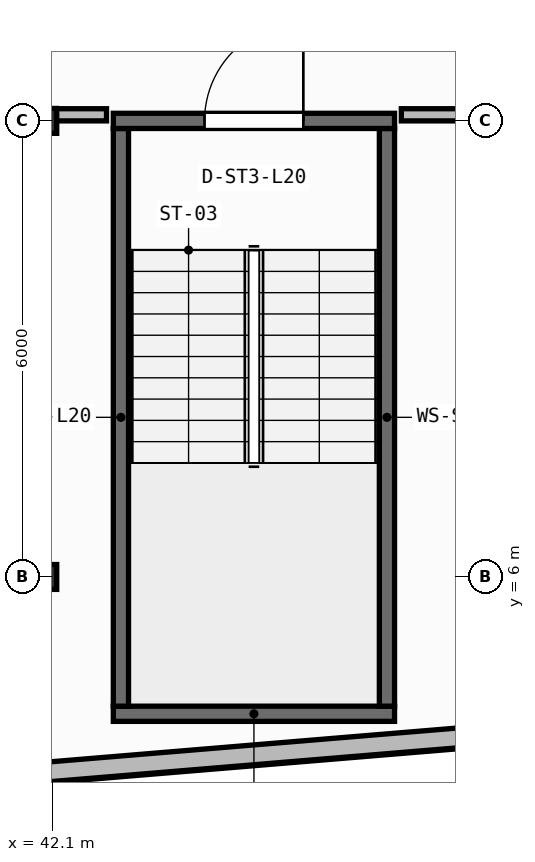
"""IFC4 building model, lengths in metres.
Left out: names, types, materials, properties, quantities, classifications, styles, units other than length and angle.
Written with IfcOpenShell. Run it as: python <this file> out.ifc"""

import sys

from ifc_helpers import new_model, si_unit, direction, frame, frame_2d, origin, origin_2d, place, context, subcontext, project, spatial, rectangle, i_section, extrude, element, fill, save


model = new_model("IFC4")
c1 = context("Model", 3, precision=1e-05, world=origin(), true_north=direction((0.0, 1.0)))
c2 = subcontext(c1, "Body", "Model", "MODEL_VIEW")
j1 = project(units=[si_unit("LENGTHUNIT", "METRE"), si_unit("PLANEANGLEUNIT", "RADIAN")], contexts=[c1])
p1 = place(None, origin())
s1 = spatial("IfcSite", under=j1, at=p1, CompositionType="ELEMENT")
p2 = place(p1, origin())
s2 = spatial("IfcBuilding", under=s1, at=p2, CompositionType="ELEMENT")
p3 = place(p2, frame((0.0, 0.0, 81.75)))
s3 = spatial("IfcBuildingStorey", under=s2, at=p3, CompositionType="ELEMENT", Elevation=81.75)
for number, where, z_axis, x_axis in (
    (1, (42.0, 6.0, 0.0), (0.0, 0.0, 1.0), (1.0, 0.0, 0.0)),
    (2, (42.0, 12.0, 0.0), (0.0, 0.0, 1.0), (1.0, 0.0, 0.0)),
):
    element("IfcColumn", number, at=place(p3, frame(where, z_axis=z_axis, x_axis=x_axis)), inside=s3, PredefinedType="COLUMN", context=c2, shape_type="SweptSolid", body=[
        extrude(i_section(OverallWidth=0.311, OverallDepth=0.327, WebThickness=0.016, FlangeThickness=0.025, FilletRadius=0.017, at=origin_2d()), origin(), (0.0, 0.0, 1.0), 3.95),
    ])
p4 = place(p3, frame((2.76, 0.174, 0.0), z_axis=(0.0, 0.0, 1.0), x_axis=(0.996571478456, 0.082736257641, 0.0)))
e3 = element("IfcWall", 3, at=p4, inside=s3, PredefinedType="STANDARD", context=c2, shape_type="SweptSolid", body=[
    extrude(rectangle(XDim=52.861, YDim=0.26, at=frame_2d((26.431, 0.0))), origin(), (0.0, 0.0, 1.0), 3.71),
])
p5 = place(p4, frame((25.231, 0.0, 0.9)))
e4 = element("IfcOpeningElement", 4, at=p5, cuts=e3, PredefinedType="OPENING", context=c2, shape_type="SweptSolid", body=[
    extrude(rectangle(XDim=2.4, YDim=1.65, at=frame_2d((1.2, 0.825))), frame((0.0, 0.14, 0.0), z_axis=(0.0, -1.0, 0.0), x_axis=(1.0, 0.0, 0.0)), (0.0, 0.0, 1.0), 0.28),
])
p6 = place(p3, frame((42.9, 4.2, 0.0), z_axis=(0.0, 0.0, 1.0), x_axis=(1.0, 0.0, 0.0)))
e5 = element("IfcWall", 5, at=p6, inside=s3, PredefinedType="SHEAR", context=c2, shape_type="SweptSolid", body=[
    extrude(rectangle(XDim=3.7, YDim=0.2, at=frame_2d((1.85, 0.0))), origin(), (0.0, 0.0, 1.0), 3.71),
])
for number, where, z_axis, x_axis in (
    (6, (43.0, 4.3, 0.0), (0.0, 0.0, 1.0), (0.0, 1.0, 0.0)),
    (7, (46.5, 4.3, 0.0), (0.0, 0.0, 1.0), (0.0, 1.0, 0.0)),
):
    element("IfcWall", number, at=place(p3, frame(where, z_axis=z_axis, x_axis=x_axis)), inside=s3, PredefinedType="SHEAR", context=c2, shape_type="SweptSolid", body=[
        extrude(rectangle(XDim=7.6, YDim=0.2, at=frame_2d((3.8, 0.0))), origin(), (0.0, 0.0, 1.0), 3.71),
    ])
p7 = place(p3, frame((42.9, 12.0, 0.0), z_axis=(0.0, 0.0, 1.0), x_axis=(1.0, 0.0, 0.0)))
e8 = element("IfcWall", 8, at=p7, inside=s3, PredefinedType="SHEAR", context=c2, shape_type="SweptSolid", body=[
    extrude(rectangle(XDim=3.7, YDim=0.2, at=frame_2d((1.85, 0.0))), origin(), (0.0, 0.0, 1.0), 3.71),
])
p8 = place(p7, frame((1.2, 0.0, 0.0)))
e9 = element("IfcOpeningElement", 9, at=p8, cuts=e8, PredefinedType="OPENING", context=c2, shape_type="SweptSolid", body=[
    extrude(rectangle(XDim=1.3, YDim=2.15, at=frame_2d((0.65, 1.075))), frame((0.0, 0.11, 0.0), z_axis=(0.0, -1.0, 0.0), x_axis=(1.0, 0.0, 0.0)), (0.0, 0.0, 1.0), 0.22),
])
p9 = place(p3, frame((31.63, 12.08, 0.0), z_axis=(0.0, 0.0, 1.0), x_axis=(1.0, 0.0, 0.0)))
e10 = element("IfcWall", 10, at=p9, inside=s3, PredefinedType="PARTITIONING", context=c2, shape_type="SweptSolid", body=[
    extrude(rectangle(XDim=11.181, YDim=0.16, at=frame_2d((5.59, 0.0))), origin(), (0.0, 0.0, 1.0), 3.073),
])
p10 = place(p3, frame((46.689, 12.08, 0.0), z_axis=(0.0, 0.0, 1.0), x_axis=(1.0, 0.0, 0.0)))
e11 = element("IfcWall", 11, at=p10, inside=s3, PredefinedType="PARTITIONING", context=c2, shape_type="SweptSolid", body=[
    extrude(rectangle(XDim=3.011, YDim=0.16, at=frame_2d((1.505, 0.0))), origin(), (0.0, 0.0, 1.0), 3.073),
])
p11 = place(p8, origin())
e12 = element("IfcDoor", 12, at=p11, inside=s3, OperationType="SINGLE_SWING_RIGHT", PredefinedType="DOOR", context=c2, shape_type="SweptSolid", body=[
    extrude(rectangle(XDim=1.3, YDim=2.15, at=frame_2d((0.65, 1.075))), frame((0.0, 0.025, 0.0), z_axis=(0.0, -1.0, 0.0), x_axis=(1.0, 0.0, 0.0)), (0.0, 0.0, 1.0), 0.05),
])
fill(e9, e12)
save(model, sys.argv[1])
